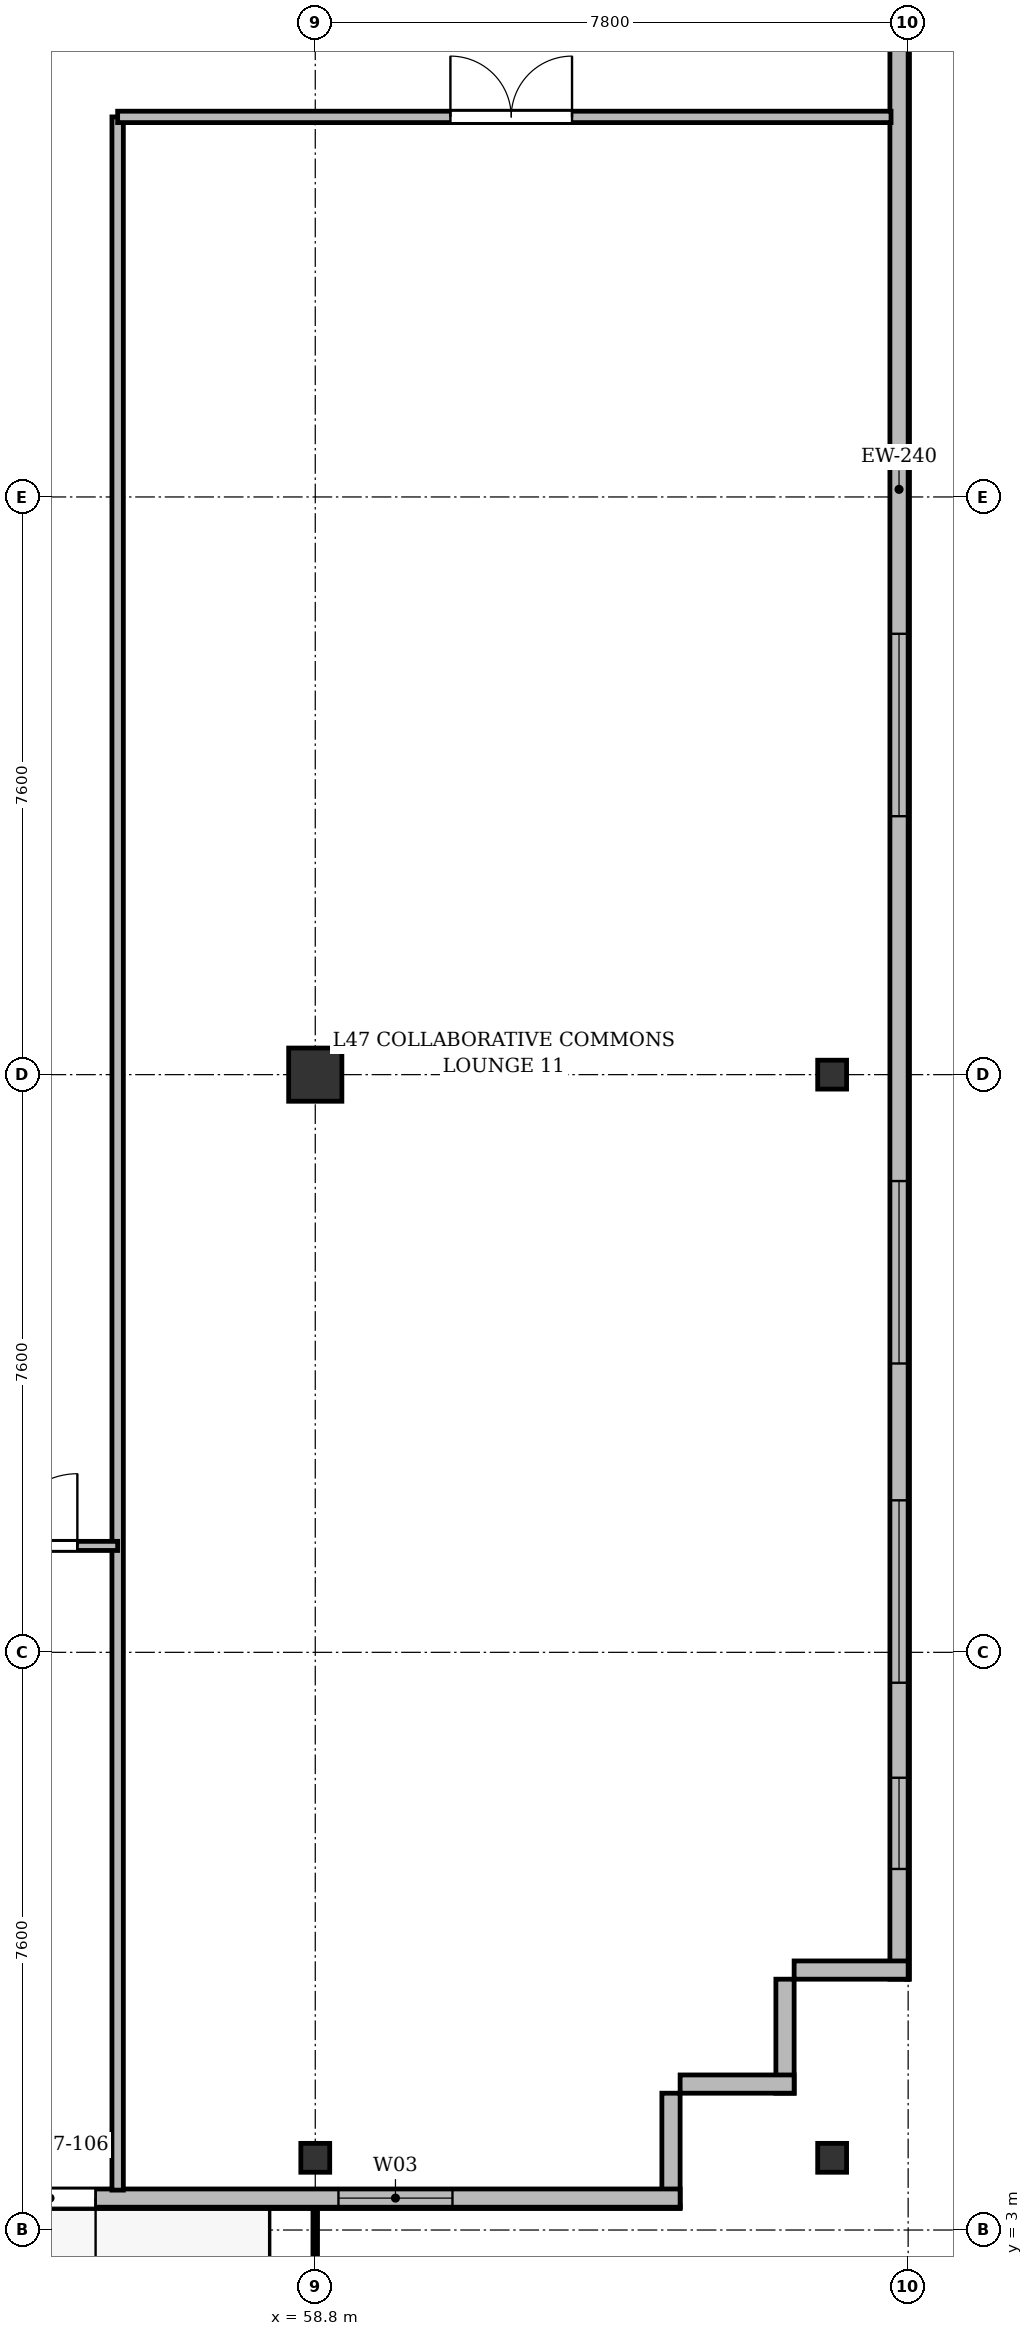
"""IFC4 building model, lengths in metres.
Left out: names, types, materials, properties, quantities, classifications, styles, units other than length and angle.
Written with IfcOpenShell. Run it as: python <this file> out.ifc"""

import sys

from ifc_helpers import new_model, si_unit, direction, frame, frame_2d, origin, origin_2d, place, context, subcontext, project, spatial, rectangle, i_section, extrude, source, transform, mapped, element, fill, save


model = new_model("IFC4")
c1 = context("Model", 3, precision=1e-05, world=origin(), true_north=direction((0.0, 1.0)))
c2 = subcontext(c1, "Body", "Model", "MODEL_VIEW")
j1 = project(units=[si_unit("LENGTHUNIT", "METRE"), si_unit("PLANEANGLEUNIT", "RADIAN")], contexts=[c1])
p1 = place(None, origin())
s1 = spatial("IfcSite", under=j1, at=p1, CompositionType="ELEMENT")
p2 = place(p1, origin())
s2 = spatial("IfcBuilding", under=s1, at=p2, CompositionType="ELEMENT")
p3 = place(p2, frame((0.0, 0.0, 178.9)))
s3 = spatial("IfcBuildingStorey", under=s2, at=p3, CompositionType="ELEMENT", Elevation=178.9)
m1 = source(origin(), c2, "Body", "SweptSolid", [
    extrude(i_section(OverallWidth=0.38, OverallDepth=0.38, WebThickness=0.02, FlangeThickness=0.03, at=origin_2d()), origin(), (0.0, 0.0, 1.0), 3.6),
])
p4 = place(p3, frame((58.8, 3.95, 0.0), z_axis=(0.0, 0.0, 1.0), x_axis=(1.0, 0.0, 0.0)))
e1 = element("IfcColumn", 1, at=p4, inside=s3, PredefinedType="COLUMN", context=c2, shape_type="MappedRepresentation", body=[
    mapped(m1, transform((0.0, 0.0, 0.0), x_axis=(1.0, 0.0, 0.0), y_axis=(0.0, 1.0, 0.0), z_axis=(0.0, 0.0, 1.0), scale=1.0)),
])
m2 = source(origin(), c2, "Body", "SweptSolid", [
    extrude(rectangle(XDim=0.7, YDim=0.7, at=origin_2d()), origin(), (0.0, 0.0, 1.0), 3.6),
])
p5 = place(p3, frame((58.8, 18.2, 0.0), z_axis=(0.0, 0.0, 1.0), x_axis=(1.0, 0.0, 0.0)))
e2 = element("IfcColumn", 2, at=p5, inside=s3, PredefinedType="COLUMN", context=c2, shape_type="MappedRepresentation", body=[
    mapped(m2, transform((0.0, 0.0, 0.0), x_axis=(1.0, 0.0, 0.0), y_axis=(0.0, 1.0, 0.0), z_axis=(0.0, 0.0, 1.0), scale=1.0)),
])
for number, where, z_axis, x_axis in (
    (3, (65.6, 3.95, 0.0), (0.0, 0.0, 1.0), (1.0, 0.0, 0.0)),
    (4, (65.6, 18.2, 0.0), (0.0, 0.0, 1.0), (1.0, 0.0, 0.0)),
):
    element("IfcColumn", number, at=place(p3, frame(where, z_axis=z_axis, x_axis=x_axis)), inside=s3, PredefinedType="COLUMN", context=c2, shape_type="MappedRepresentation", body=[
        mapped(m1, transform((0.0, 0.0, 0.0), x_axis=(1.0, 0.0, 0.0), y_axis=(0.0, 1.0, 0.0), z_axis=(0.0, 0.0, 1.0), scale=1.0)),
    ])
p6 = place(p3, frame((66.48, 45.5, 0.0), z_axis=(0.0, 0.0, 1.0), x_axis=(0.0, -1.0, 0.0)))
e5 = element("IfcWall", 5, at=p6, inside=s3, PredefinedType="SOLIDWALL", context=c2, shape_type="SweptSolid", body=[
    extrude(rectangle(XDim=39.2, YDim=0.24, at=frame_2d((19.6, 0.0))), origin(), (0.0, 0.0, 1.0), 3.22),
])
p7 = place(p6, frame((36.55, 0.0, 0.92)))
e6 = element("IfcOpeningElement", 6, at=p7, cuts=e5, PredefinedType="OPENING", context=c2, shape_type="SweptSolid", body=[
    extrude(rectangle(XDim=1.2, YDim=1.65, at=frame_2d((0.6, 0.825))), frame((0.0, 0.13, 0.0), z_axis=(0.0, -1.0, 0.0), x_axis=(1.0, 0.0, 0.0)), (0.0, 0.0, 1.0), 0.26),
])
p8 = place(p6, frame((32.9, 0.0, 0.92)))
e7 = element("IfcOpeningElement", 7, at=p8, cuts=e5, PredefinedType="OPENING", context=c2, shape_type="SweptSolid", body=[
    extrude(rectangle(XDim=2.4, YDim=2.1, at=frame_2d((1.2, 1.05))), frame((0.0, 0.13, 0.0), z_axis=(0.0, -1.0, 0.0), x_axis=(1.0, 0.0, 0.0)), (0.0, 0.0, 1.0), 0.26),
])
p9 = place(p6, frame((28.7, 0.0, 0.92)))
e8 = element("IfcOpeningElement", 8, at=p9, cuts=e5, PredefinedType="OPENING", context=c2, shape_type="SweptSolid", body=[
    extrude(rectangle(XDim=2.4, YDim=2.1, at=frame_2d((1.2, 1.05))), frame((0.0, 0.13, 0.0), z_axis=(0.0, -1.0, 0.0), x_axis=(1.0, 0.0, 0.0)), (0.0, 0.0, 1.0), 0.26),
])
p10 = place(p6, frame((21.5, 0.0, 0.92)))
e9 = element("IfcOpeningElement", 9, at=p10, cuts=e5, PredefinedType="OPENING", context=c2, shape_type="SweptSolid", body=[
    extrude(rectangle(XDim=2.4, YDim=2.1, at=frame_2d((1.2, 1.05))), frame((0.0, 0.13, 0.0), z_axis=(0.0, -1.0, 0.0), x_axis=(1.0, 0.0, 0.0)), (0.0, 0.0, 1.0), 0.26),
])
p11 = place(p6, frame((7.5, 0.0, 0.92)))
e10 = element("IfcOpeningElement", 10, at=p11, cuts=e5, PredefinedType="OPENING", context=c2, shape_type="SweptSolid", body=[
    extrude(rectangle(XDim=2.4, YDim=2.1, at=frame_2d((1.2, 1.05))), frame((0.0, 0.13, 0.0), z_axis=(0.0, -1.0, 0.0), x_axis=(1.0, 0.0, 0.0)), (0.0, 0.0, 1.0), 0.26),
])
p12 = place(p6, frame((4.5, 0.0, 0.92)))
e11 = element("IfcOpeningElement", 11, at=p12, cuts=e5, PredefinedType="OPENING", context=c2, shape_type="SweptSolid", body=[
    extrude(rectangle(XDim=1.2, YDim=1.65, at=frame_2d((0.6, 0.825))), frame((0.0, 0.13, 0.0), z_axis=(0.0, -1.0, 0.0), x_axis=(1.0, 0.0, 0.0)), (0.0, 0.0, 1.0), 0.26),
])
p13 = place(p6, frame((1.15, 0.0, 0.92)))
e12 = element("IfcOpeningElement", 12, at=p13, cuts=e5, PredefinedType="OPENING", context=c2, shape_type="SweptSolid", body=[
    extrude(rectangle(XDim=1.2, YDim=1.65, at=frame_2d((0.6, 0.825))), frame((0.0, 0.13, 0.0), z_axis=(0.0, -1.0, 0.0), x_axis=(1.0, 0.0, 0.0)), (0.0, 0.0, 1.0), 0.26),
])
p14 = place(p3, frame((66.6, 6.42, 0.0), z_axis=(0.0, 0.0, 1.0), x_axis=(-1.0, 0.0, 0.0)))
e13 = element("IfcWall", 13, at=p14, inside=s3, PredefinedType="SOLIDWALL", context=c2, shape_type="SweptSolid", body=[
    extrude(rectangle(XDim=1.5, YDim=0.24, at=frame_2d((0.75, 0.0))), origin(), (0.0, 0.0, 1.0), 2.72),
])
for number, where, z_axis, x_axis in (
    (14, (64.98, 6.3, 0.0), (0.0, 0.0, 1.0), (0.0, -1.0, 0.0)),
    (15, (65.1, 4.92, 0.0), (0.0, 0.0, 1.0), (-1.0, 0.0, 0.0)),
):
    element("IfcWall", number, at=place(p3, frame(where, z_axis=z_axis, x_axis=x_axis)), inside=s3, PredefinedType="SOLIDWALL", context=c2, shape_type="SweptSolid", body=[
        extrude(rectangle(XDim=1.5, YDim=0.24, at=frame_2d((0.75, 0.0))), origin(), (0.0, 0.0, 1.0), 3.22),
    ])
p15 = place(p3, frame((63.48, 4.8, 0.0), z_axis=(0.0, 0.0, 1.0), x_axis=(0.0, -1.0, 0.0)))
e16 = element("IfcWall", 16, at=p15, inside=s3, PredefinedType="SOLIDWALL", context=c2, shape_type="SweptSolid", body=[
    extrude(rectangle(XDim=1.5, YDim=0.24, at=frame_2d((0.75, 0.0))), origin(), (0.0, 0.0, 1.0), 2.62),
])
p16 = place(p3, frame((63.6, 3.42, 0.0), z_axis=(0.0, 0.0, 1.0), x_axis=(-1.0, 0.0, 0.0)))
e17 = element("IfcWall", 17, at=p16, inside=s3, PredefinedType="SOLIDWALL", context=c2, shape_type="SweptSolid", body=[
    extrude(rectangle(XDim=34.0, YDim=0.24, at=frame_2d((17.0, 0.0))), origin(), (0.0, 0.0, 1.0), 3.22),
])
p17 = place(p16, frame((2.995, 0.0, 0.9)))
e18 = element("IfcOpeningElement", 18, at=p17, cuts=e17, PredefinedType="OPENING", context=c2, shape_type="SweptSolid", body=[
    extrude(rectangle(XDim=1.5, YDim=1.75, at=frame_2d((0.75, 0.875))), frame((0.0, 0.13, 0.0), z_axis=(0.0, -1.0, 0.0), x_axis=(1.0, 0.0, 0.0)), (0.0, 0.0, 1.0), 0.26),
])
p18 = place(p16, frame((7.69, 0.0, 0.0)))
e19 = element("IfcOpeningElement", 19, at=p18, cuts=e17, PredefinedType="OPENING", context=c2, shape_type="SweptSolid", body=[
    extrude(rectangle(XDim=1.2, YDim=2.2, at=frame_2d((0.6, 1.1))), frame((0.0, 0.13, 0.0), z_axis=(0.0, -1.0, 0.0), x_axis=(1.0, 0.0, 0.0)), (0.0, 0.0, 1.0), 0.26),
])
p19 = place(p16, frame((10.175, 0.0, 0.9)))
e20 = element("IfcOpeningElement", 20, at=p19, cuts=e17, PredefinedType="OPENING", context=c2, shape_type="SweptSolid", body=[
    extrude(rectangle(XDim=1.65, YDim=1.85, at=frame_2d((0.825, 0.925))), frame((0.0, 0.13, 0.0), z_axis=(0.0, -1.0, 0.0), x_axis=(1.0, 0.0, 0.0)), (0.0, 0.0, 1.0), 0.26),
])
p20 = place(p16, frame((13.5, 0.0, 0.9)))
e21 = element("IfcOpeningElement", 21, at=p20, cuts=e17, PredefinedType="OPENING", context=c2, shape_type="SweptSolid", body=[
    extrude(rectangle(XDim=1.8, YDim=1.8, at=frame_2d((0.9, 0.9))), frame((0.0, 0.13, 0.0), z_axis=(0.0, -1.0, 0.0), x_axis=(1.0, 0.0, 0.0)), (0.0, 0.0, 1.0), 0.26),
])
p21 = place(p16, frame((16.9, 0.0, 0.9)))
e22 = element("IfcOpeningElement", 22, at=p21, cuts=e17, PredefinedType="OPENING", context=c2, shape_type="SweptSolid", body=[
    extrude(rectangle(XDim=2.2, YDim=1.8, at=frame_2d((1.1, 0.9))), frame((0.0, 0.13, 0.0), z_axis=(0.0, -1.0, 0.0), x_axis=(1.0, 0.0, 0.0)), (0.0, 0.0, 1.0), 0.26),
])
p22 = place(p16, frame((21.85, 0.0, 0.9)))
e23 = element("IfcOpeningElement", 23, at=p22, cuts=e17, PredefinedType="OPENING", context=c2, shape_type="SweptSolid", body=[
    extrude(rectangle(XDim=1.5, YDim=1.75, at=frame_2d((0.75, 0.875))), frame((0.0, 0.13, 0.0), z_axis=(0.0, -1.0, 0.0), x_axis=(1.0, 0.0, 0.0)), (0.0, 0.0, 1.0), 0.26),
])
p23 = place(p16, frame((28.2, 0.0, 0.9)))
e24 = element("IfcOpeningElement", 24, at=p23, cuts=e17, PredefinedType="OPENING", context=c2, shape_type="SweptSolid", body=[
    extrude(rectangle(XDim=2.0, YDim=1.95, at=frame_2d((1.0, 0.975))), frame((0.0, 0.13, 0.0), z_axis=(0.0, -1.0, 0.0), x_axis=(1.0, 0.0, 0.0)), (0.0, 0.0, 1.0), 0.26),
])
p24 = place(p3, frame((56.2, 3.525, 0.0), z_axis=(0.0, 0.0, 1.0), x_axis=(0.0, 1.0, 0.0)))
e25 = element("IfcWall", 25, at=p24, inside=s3, PredefinedType="PARTITIONING", context=c2, shape_type="SweptSolid", body=[
    extrude(rectangle(XDim=27.275, YDim=0.15, at=frame_2d((13.638, 0.0))), origin(), (0.0, 0.0, 1.0), 2.62),
])
p25 = place(p3, frame((54.2, 12.0, 0.0), z_axis=(0.0, 0.0, 1.0), x_axis=(1.0, 0.0, 0.0)))
e26 = element("IfcWall", 26, at=p25, inside=s3, PredefinedType="PARTITIONING", context=c2, shape_type="SweptSolid", body=[
    extrude(rectangle(XDim=2.0, YDim=0.12, at=frame_2d((1.0, 0.0))), origin(), (0.0, 0.0, 1.0), 3.22),
])
p26 = place(p25, frame((0.52, 0.0, 0.0)))
e27 = element("IfcOpeningElement", 27, at=p26, cuts=e26, PredefinedType="OPENING", context=c2, shape_type="SweptSolid", body=[
    extrude(rectangle(XDim=0.95, YDim=2.15, at=frame_2d((0.475, 1.075))), frame((0.0, 0.07, 0.0), z_axis=(0.0, -1.0, 0.0), x_axis=(1.0, 0.0, 0.0)), (0.0, 0.0, 1.0), 0.14),
])
p27 = place(p3, frame((56.2, 30.8, 0.0), z_axis=(0.0, 0.0, 1.0), x_axis=(1.0, 0.0, 0.0)))
e28 = element("IfcWall", 28, at=p27, inside=s3, PredefinedType="PARTITIONING", context=c2, shape_type="SweptSolid", body=[
    extrude(rectangle(XDim=10.175, YDim=0.15, at=frame_2d((5.087, 0.0))), origin(), (0.0, 0.0, 1.0), 2.72),
])
p28 = place(p27, frame((4.378, 0.0, 0.0)))
e29 = element("IfcOpeningElement", 29, at=p28, cuts=e28, PredefinedType="OPENING", context=c2, shape_type="SweptSolid", body=[
    extrude(rectangle(XDim=1.6, YDim=2.2, at=frame_2d((0.8, 1.1))), frame((0.0, 0.085, 0.0), z_axis=(0.0, -1.0, 0.0), x_axis=(1.0, 0.0, 0.0)), (0.0, 0.0, 1.0), 0.17),
])
m3 = source(origin(), c2, "Body", "SweptSolid", [
    extrude(rectangle(XDim=1.2, YDim=1.65, at=frame_2d((0.6, 0.825))), frame((0.0, 0.03, 0.0), z_axis=(0.0, -1.0, 0.0), x_axis=(1.0, 0.0, 0.0)), (0.0, 0.0, 1.0), 0.06),
])
p29 = place(p7, origin())
e30 = element("IfcWindow", 30, at=p29, inside=s3, PartitioningType="SINGLE_PANEL", PredefinedType="WINDOW", context=c2, shape_type="MappedRepresentation", body=[
    mapped(m3, transform((0.0, 0.0, 0.0), x_axis=(1.0, 0.0, 0.0), y_axis=(0.0, 1.0, 0.0), z_axis=(0.0, 0.0, 1.0), scale=1.0)),
])
fill(e6, e30)
m4 = source(origin(), c2, "Body", "SweptSolid", [
    extrude(rectangle(XDim=2.4, YDim=2.1, at=frame_2d((1.2, 1.05))), frame((0.0, 0.03, 0.0), z_axis=(0.0, -1.0, 0.0), x_axis=(1.0, 0.0, 0.0)), (0.0, 0.0, 1.0), 0.06),
])
p30 = place(p8, origin())
e31 = element("IfcWindow", 31, at=p30, inside=s3, PartitioningType="SINGLE_PANEL", PredefinedType="WINDOW", context=c2, shape_type="MappedRepresentation", body=[
    mapped(m4, transform((0.0, 0.0, 0.0), x_axis=(1.0, 0.0, 0.0), y_axis=(0.0, 1.0, 0.0), z_axis=(0.0, 0.0, 1.0), scale=1.0)),
])
fill(e7, e31)
p31 = place(p9, origin())
e32 = element("IfcWindow", 32, at=p31, inside=s3, PartitioningType="SINGLE_PANEL", PredefinedType="WINDOW", context=c2, shape_type="MappedRepresentation", body=[
    mapped(m4, transform((0.0, 0.0, 0.0), x_axis=(1.0, 0.0, 0.0), y_axis=(0.0, 1.0, 0.0), z_axis=(0.0, 0.0, 1.0), scale=1.0)),
])
fill(e8, e32)
p32 = place(p10, origin())
e33 = element("IfcWindow", 33, at=p32, inside=s3, PartitioningType="SINGLE_PANEL", PredefinedType="WINDOW", context=c2, shape_type="MappedRepresentation", body=[
    mapped(m4, transform((0.0, 0.0, 0.0), x_axis=(1.0, 0.0, 0.0), y_axis=(0.0, 1.0, 0.0), z_axis=(0.0, 0.0, 1.0), scale=1.0)),
])
fill(e9, e33)
m5 = source(origin(), c2, "Body", "SweptSolid", [
    extrude(rectangle(XDim=1.5, YDim=1.75, at=frame_2d((0.75, 0.875))), frame((0.0, 0.03, 0.0), z_axis=(0.0, -1.0, 0.0), x_axis=(1.0, 0.0, 0.0)), (0.0, 0.0, 1.0), 0.06),
])
p33 = place(p17, origin())
e34 = element("IfcWindow", 34, at=p33, inside=s3, PartitioningType="SINGLE_PANEL", PredefinedType="WINDOW", context=c2, shape_type="MappedRepresentation", body=[
    mapped(m5, transform((0.0, 0.0, 0.0), x_axis=(1.0, 0.0, 0.0), y_axis=(0.0, 1.0, 0.0), z_axis=(0.0, 0.0, 1.0), scale=1.0)),
])
fill(e18, e34)
m6 = source(origin(), c2, "Body", "SweptSolid", [
    extrude(rectangle(XDim=1.2, YDim=2.2, at=frame_2d((0.6, 1.1))), frame((0.0, 0.025, 0.0), z_axis=(0.0, -1.0, 0.0), x_axis=(1.0, 0.0, 0.0)), (0.0, 0.0, 1.0), 0.05),
])
p34 = place(p18, origin())
e35 = element("IfcDoor", 35, at=p34, inside=s3, OperationType="SINGLE_SWING_LEFT", PredefinedType="DOOR", context=c2, shape_type="MappedRepresentation", body=[
    mapped(m6, transform((0.0, 0.0, 0.0), x_axis=(1.0, 0.0, 0.0), y_axis=(0.0, 1.0, 0.0), z_axis=(0.0, 0.0, 1.0), scale=1.0)),
])
fill(e19, e35)
m7 = source(origin(), c2, "Body", "SweptSolid", [
    extrude(rectangle(XDim=0.95, YDim=2.15, at=frame_2d((0.475, 1.075))), frame((0.0, 0.025, 0.0), z_axis=(0.0, -1.0, 0.0), x_axis=(1.0, 0.0, 0.0)), (0.0, 0.0, 1.0), 0.05),
])
p35 = place(p26, origin())
e36 = element("IfcDoor", 36, at=p35, inside=s3, OperationType="SINGLE_SWING_RIGHT", PredefinedType="DOOR", context=c2, shape_type="MappedRepresentation", body=[
    mapped(m7, transform((0.0, 0.0, 0.0), x_axis=(1.0, 0.0, 0.0), y_axis=(0.0, 1.0, 0.0), z_axis=(0.0, 0.0, 1.0), scale=1.0)),
])
fill(e27, e36)
m8 = source(origin(), c2, "Body", "SweptSolid", [
    extrude(rectangle(XDim=1.6, YDim=2.2, at=frame_2d((0.8, 1.1))), frame((0.0, 0.025, 0.0), z_axis=(0.0, -1.0, 0.0), x_axis=(1.0, 0.0, 0.0)), (0.0, 0.0, 1.0), 0.05),
])
p36 = place(p28, origin())
e37 = element("IfcDoor", 37, at=p36, inside=s3, OperationType="DOUBLE_DOOR_SINGLE_SWING", PredefinedType="DOOR", context=c2, shape_type="MappedRepresentation", body=[
    mapped(m8, transform((0.0, 0.0, 0.0), x_axis=(1.0, 0.0, 0.0), y_axis=(0.0, 1.0, 0.0), z_axis=(0.0, 0.0, 1.0), scale=1.0)),
])
fill(e29, e37)
save(model, sys.argv[1])
